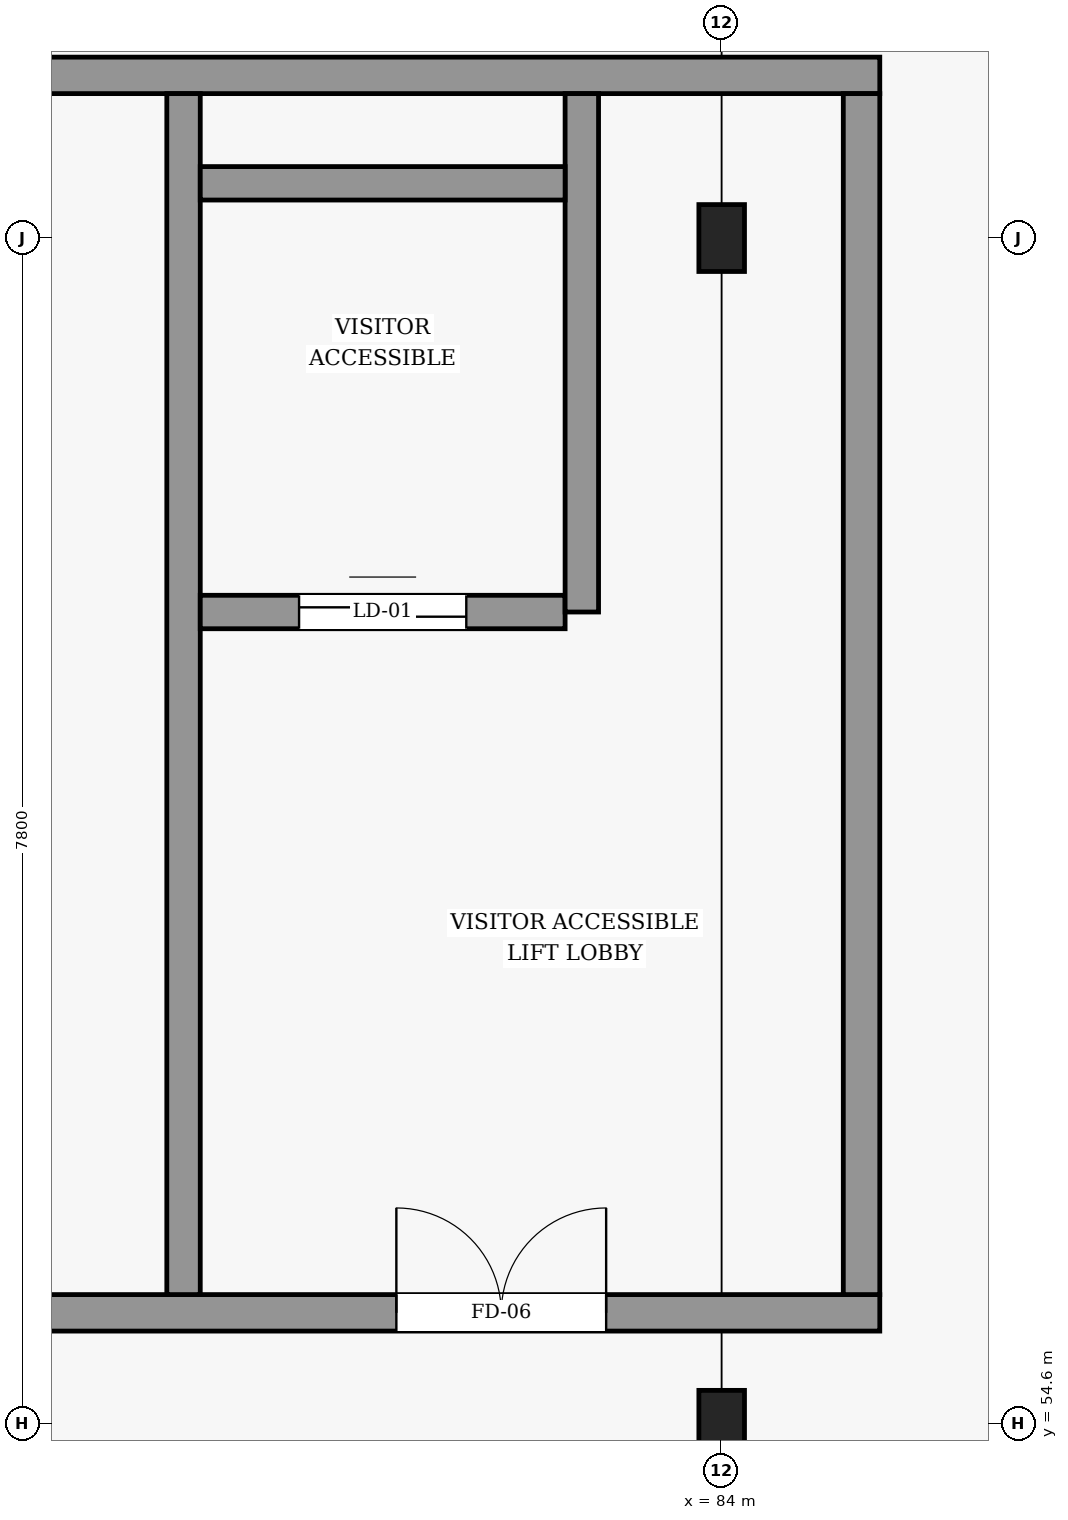
"""IFC4 building model, lengths in metres.
Left out: names, types, materials, properties, quantities, classifications, styles, units other than length and angle.
Written with IfcOpenShell. Run it as: python <this file> out.ifc"""

import sys

from ifc_helpers import new_model, si_unit, direction, frame, frame_2d, origin, origin_2d, place, context, subcontext, project, spatial, rectangle, i_section, extrude, element, fill, save


model = new_model("IFC4")
c1 = context("Model", 3, precision=1e-05, world=origin(), true_north=direction((0.0, 1.0)))
c2 = subcontext(c1, "Body", "Model", "MODEL_VIEW")
j1 = project(units=[si_unit("LENGTHUNIT", "METRE"), si_unit("PLANEANGLEUNIT", "RADIAN")], contexts=[c1])
p1 = place(None, origin())
s1 = spatial("IfcSite", under=j1, at=p1, CompositionType="ELEMENT")
p2 = place(p1, origin())
s2 = spatial("IfcBuilding", under=s1, at=p2, CompositionType="ELEMENT")
p3 = place(p2, origin())
s3 = spatial("IfcBuildingStorey", under=s2, at=p3, CompositionType="ELEMENT", Elevation=0.0)
for number, where, z_axis, x_axis in (
    (1, (84.0, 54.6, 0.0), (0.0, 0.0, 1.0), (1.0, 0.0, 0.0)),
    (2, (84.0, 62.4, 0.0), (0.0, 0.0, 1.0), (1.0, 0.0, 0.0)),
):
    element("IfcColumn", number, at=place(p3, frame(where, z_axis=z_axis, x_axis=x_axis)), inside=s3, PredefinedType="COLUMN", context=c2, shape_type="SweptSolid", body=[
        extrude(i_section(OverallWidth=0.3, OverallDepth=0.44, WebThickness=0.011, FlangeThickness=0.018, FilletRadius=0.024, at=origin_2d()), origin(), (0.0, 0.0, 1.0), 4.8),
    ])
p4 = place(p3, frame((76.56, 55.33, 0.0), z_axis=(0.0, 0.0, 1.0), x_axis=(1.0, 0.0, 0.0)))
e3 = element("IfcWall", 3, at=p4, inside=s3, PredefinedType="SHEAR", context=c2, shape_type="SweptSolid", body=[
    extrude(rectangle(XDim=8.48, YDim=0.24, at=frame_2d((4.24, 0.0))), origin(), (0.0, 0.0, 1.0), 4.56),
])
p5 = place(p4, frame((1.4, 0.0, 0.0)))
e4 = element("IfcOpeningElement", 4, at=p5, cuts=e3, PredefinedType="OPENING", context=c2, shape_type="SweptSolid", body=[
    extrude(rectangle(XDim=1.22, YDim=2.18, at=frame_2d((0.61, 1.09))), frame((0.0, 0.13, 0.0), z_axis=(0.0, -1.0, 0.0), x_axis=(1.0, 0.0, 0.0)), (0.0, 0.0, 1.0), 0.26),
])
p6 = place(p4, frame((5.3, 0.0, 0.0)))
e5 = element("IfcOpeningElement", 5, at=p6, cuts=e3, PredefinedType="OPENING", context=c2, shape_type="SweptSolid", body=[
    extrude(rectangle(XDim=1.38, YDim=2.15, at=frame_2d((0.69, 1.075))), frame((0.0, 0.13, 0.0), z_axis=(0.0, -1.0, 0.0), x_axis=(1.0, 0.0, 0.0)), (0.0, 0.0, 1.0), 0.26),
])
p7 = place(p3, frame((76.56, 63.47, 0.0), z_axis=(0.0, 0.0, 1.0), x_axis=(1.0, 0.0, 0.0)))
e6 = element("IfcWall", 6, at=p7, inside=s3, PredefinedType="SHEAR", context=c2, shape_type="SweptSolid", body=[
    extrude(rectangle(XDim=8.48, YDim=0.24, at=frame_2d((4.24, 0.0))), origin(), (0.0, 0.0, 1.0), 4.56),
])
p8 = place(p3, frame((80.46, 55.45, 0.0), z_axis=(0.0, 0.0, 1.0), x_axis=(0.0, 1.0, 0.0)))
e7 = element("IfcWall", 7, at=p8, inside=s3, PredefinedType="SHEAR", context=c2, shape_type="SweptSolid", body=[
    extrude(rectangle(XDim=7.9, YDim=0.22, at=frame_2d((3.95, 0.0))), origin(), (0.0, 0.0, 1.0), 4.56),
])
p9 = place(p3, frame((84.92, 55.45, 0.0), z_axis=(0.0, 0.0, 1.0), x_axis=(0.0, 1.0, 0.0)))
e8 = element("IfcWall", 8, at=p9, inside=s3, PredefinedType="SHEAR", context=c2, shape_type="SweptSolid", body=[
    extrude(rectangle(XDim=7.9, YDim=0.24, at=frame_2d((3.95, 0.0))), origin(), (0.0, 0.0, 1.0), 4.56),
])
p10 = place(p3, frame((80.57, 59.94, 0.0), z_axis=(0.0, 0.0, 1.0), x_axis=(1.0, 0.0, 0.0)))
e9 = element("IfcWall", 9, at=p10, inside=s3, PredefinedType="SHEAR", context=c2, shape_type="SweptSolid", body=[
    extrude(rectangle(XDim=2.4, YDim=0.22, at=frame_2d((1.2, 0.0))), origin(), (0.0, 0.0, 1.0), 4.56),
])
p11 = place(p10, frame((0.65, 0.0, 0.0)))
e10 = element("IfcOpeningElement", 10, at=p11, cuts=e9, PredefinedType="OPENING", context=c2, shape_type="SweptSolid", body=[
    extrude(rectangle(XDim=1.1, YDim=2.15, at=frame_2d((0.55, 1.075))), frame((0.0, 0.12, 0.0), z_axis=(0.0, -1.0, 0.0), x_axis=(1.0, 0.0, 0.0)), (0.0, 0.0, 1.0), 0.24),
])
p12 = place(p3, frame((83.08, 59.94, 0.0), z_axis=(0.0, 0.0, 1.0), x_axis=(0.0, 1.0, 0.0)))
e11 = element("IfcWall", 11, at=p12, inside=s3, PredefinedType="SHEAR", context=c2, shape_type="SweptSolid", body=[
    extrude(rectangle(XDim=3.41, YDim=0.22, at=frame_2d((1.705, 0.0))), origin(), (0.0, 0.0, 1.0), 4.56),
])
p13 = place(p3, frame((80.57, 62.76, 0.0), z_axis=(0.0, 0.0, 1.0), x_axis=(1.0, 0.0, 0.0)))
e12 = element("IfcWall", 12, at=p13, inside=s3, PredefinedType="SHEAR", context=c2, shape_type="SweptSolid", body=[
    extrude(rectangle(XDim=2.4, YDim=0.22, at=frame_2d((1.2, 0.0))), origin(), (0.0, 0.0, 1.0), 4.56),
])
p14 = place(p6, frame((1.38, 0.0, 0.0), z_axis=(0.0, 0.0, 1.0), x_axis=(-1.0, 0.0, 0.0)))
e13 = element("IfcDoor", 13, at=p14, inside=s3, OperationType="DOUBLE_DOOR_SINGLE_SWING", PredefinedType="DOOR", context=c2, shape_type="SweptSolid", body=[
    extrude(rectangle(XDim=1.38, YDim=2.15, at=frame_2d((0.69, 1.075))), frame((0.0, 0.025, 0.0), z_axis=(0.0, -1.0, 0.0), x_axis=(1.0, 0.0, 0.0)), (0.0, 0.0, 1.0), 0.05),
])
fill(e5, e13)
p15 = place(p11, origin())
e14 = element("IfcDoor", 14, at=p15, inside=s3, OperationType="SLIDING_TO_LEFT", PredefinedType="DOOR", context=c2, shape_type="SweptSolid", body=[
    extrude(rectangle(XDim=1.1, YDim=2.15, at=frame_2d((0.55, 1.075))), frame((0.0, 0.025, 0.0), z_axis=(0.0, -1.0, 0.0), x_axis=(1.0, 0.0, 0.0)), (0.0, 0.0, 1.0), 0.05),
])
fill(e10, e14)
save(model, sys.argv[1])
